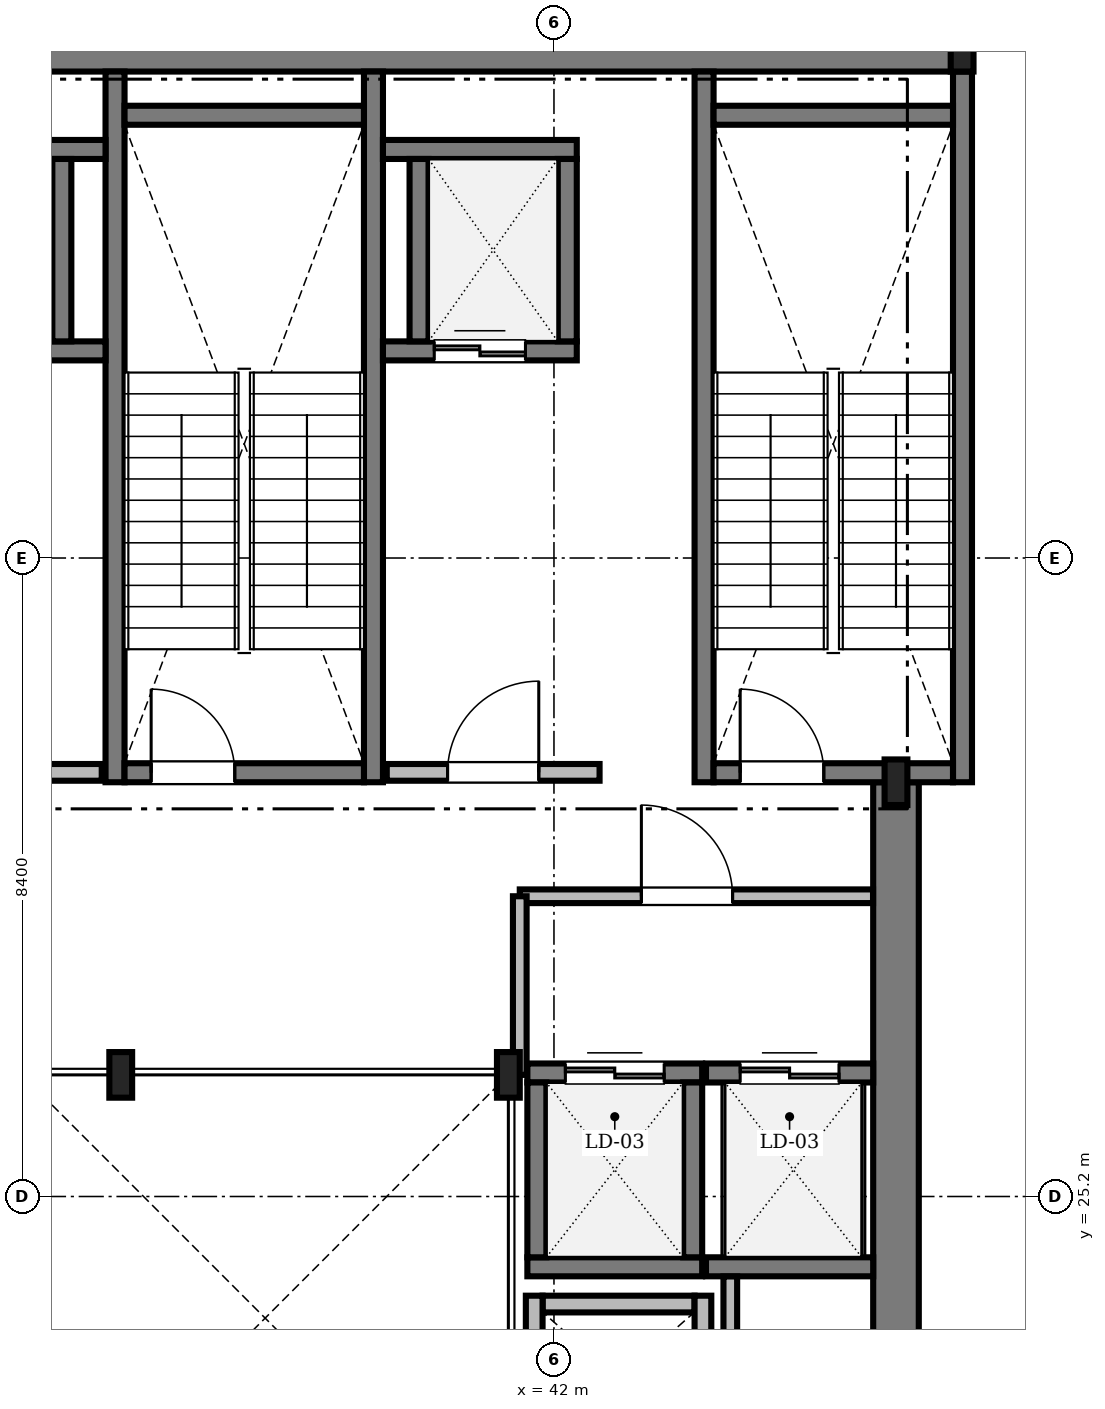
"""IFC4 building model, lengths in metres.
Left out: names, types, materials, properties, quantities, classifications, styles, units other than length and angle.
Written with IfcOpenShell. Run it as: python <this file> out.ifc"""

import sys

from ifc_helpers import new_model, si_unit, direction, frame, frame_2d, origin, origin_2d, place, context, subcontext, project, spatial, rectangle, i_section, extrude, source, transform, mapped, element, fill, save


model = new_model("IFC4")
c1 = context("Model", 3, precision=1e-05, world=origin(), true_north=direction((0.0, 1.0)))
c2 = subcontext(c1, "Body", "Model", "MODEL_VIEW")
j1 = project(units=[si_unit("LENGTHUNIT", "METRE"), si_unit("PLANEANGLEUNIT", "RADIAN")], contexts=[c1])
p1 = place(None, origin())
s1 = spatial("IfcSite", under=j1, at=p1, CompositionType="ELEMENT")
p2 = place(p1, origin())
s2 = spatial("IfcBuilding", under=s1, at=p2, CompositionType="ELEMENT")
p3 = place(p2, frame((0.0, 0.0, 286.15)))
s3 = spatial("IfcBuildingStorey", under=s2, at=p3, CompositionType="ELEMENT", Elevation=286.15)
m1 = source(origin(), c2, "Body", "SweptSolid", [
    extrude(rectangle(XDim=17.52, YDim=0.6, at=frame_2d((8.76, 0.0))), origin(), (0.0, 0.0, 1.0), 4.7),
])
p4 = place(p3, frame((29.85, 40.3, 0.0), z_axis=(0.0, 0.0, 1.0), x_axis=(1.0, 0.0, 0.0)))
e1 = element("IfcWall", 1, at=p4, inside=s3, PredefinedType="SHEAR", context=c2, shape_type="MappedRepresentation", body=[
    mapped(m1, transform((0.0, 0.0, 0.0), scale=1.0)),
])
m2 = source(origin(), c2, "Body", "SweptSolid", [
    extrude(rectangle(XDim=13.15, YDim=0.6, at=frame_2d((6.575, 0.0))), origin(), (0.0, 0.0, 1.0), 4.7),
])
p5 = place(p3, frame((46.5, 17.5, 0.0), z_axis=(0.0, 0.0, 1.0), x_axis=(0.0, 1.0, 0.0)))
e2 = element("IfcWall", 2, at=p5, inside=s3, PredefinedType="SHEAR", context=c2, shape_type="MappedRepresentation", body=[
    mapped(m2, transform((0.0, 0.0, 0.0), scale=1.0)),
])
m3 = source(origin(), c2, "Body", "SweptSolid", [
    extrude(i_section(OverallWidth=0.3, OverallDepth=0.6, WebThickness=0.015, FlangeThickness=0.03, FilletRadius=0.027, at=origin_2d()), origin(), (0.0, 0.0, 1.0), 4.7),
])
for number, where, z_axis, x_axis in (
    (3, (41.4, 26.8, 0.0), (0.0, 0.0, 1.0), (1.0, 0.0, 0.0)),
    (4, (36.3, 26.8, 0.0), (0.0, 0.0, 1.0), (1.0, 0.0, 0.0)),
    (5, (46.5, 30.65, 0.0), (0.0, 0.0, 1.0), (1.0, 0.0, 0.0)),
    (6, (47.37, 40.3, 0.0), (0.0, 0.0, 1.0), (1.0, 0.0, 0.0)),
):
    element("IfcColumn", number, at=place(p3, frame(where, z_axis=z_axis, x_axis=x_axis)), inside=s3, PredefinedType="COLUMN", context=c2, shape_type="MappedRepresentation", body=[
        mapped(m3, transform((0.0, 0.0, 0.0), scale=1.0)),
    ])
m4 = source(origin(), c2, "Body", "SweptSolid", [
    extrude(rectangle(XDim=9.35, YDim=0.25, at=frame_2d((4.675, 0.0))), origin(), (0.0, 0.0, 1.0), 4.8),
])
for number, where, z_axis, x_axis in (
    (7, (36.225, 30.65, 0.0), (0.0, 0.0, 1.0), (0.0, 1.0, 0.0)),
    (8, (39.625, 30.65, 0.0), (0.0, 0.0, 1.0), (0.0, 1.0, 0.0)),
):
    element("IfcWall", number, at=place(p3, frame(where, z_axis=z_axis, x_axis=x_axis)), inside=s3, PredefinedType="SOLIDWALL", context=c2, shape_type="MappedRepresentation", body=[
        mapped(m4, transform((0.0, 0.0, 0.0), scale=1.0)),
    ])
m5 = source(origin(), c2, "Body", "SweptSolid", [
    extrude(rectangle(XDim=3.15, YDim=0.25, at=frame_2d((1.575, 0.0))), origin(), (0.0, 0.0, 1.0), 4.8),
])
p6 = place(p3, frame((36.35, 39.425, 0.0), z_axis=(0.0, 0.0, 1.0), x_axis=(1.0, 0.0, 0.0)))
e9 = element("IfcWall", 9, at=p6, inside=s3, PredefinedType="SOLIDWALL", context=c2, shape_type="MappedRepresentation", body=[
    mapped(m5, transform((0.0, 0.0, 0.0), scale=1.0)),
])
p7 = place(p3, frame((36.35, 30.775, 0.0), z_axis=(0.0, 0.0, 1.0), x_axis=(1.0, 0.0, 0.0)))
e10 = element("IfcWall", 10, at=p7, inside=s3, PredefinedType="SOLIDWALL", context=c2, shape_type="MappedRepresentation", body=[
    mapped(m5, transform((0.0, 0.0, 0.0), scale=1.0)),
])
m6 = source(origin(), c2, "Body", "SweptSolid", [
    extrude(rectangle(XDim=1.1, YDim=2.2, at=frame_2d((0.55, 1.1))), frame((0.0, 0.135, 0.0), z_axis=(0.0, -1.0, 0.0), x_axis=(1.0, 0.0, 0.0)), (0.0, 0.0, 1.0), 0.27),
])
p8 = place(p7, frame((0.35, 0.0, 0.0)))
e11 = element("IfcOpeningElement", 11, at=p8, cuts=e10, PredefinedType="OPENING", context=c2, shape_type="MappedRepresentation", body=[
    mapped(m6, transform((0.0, 0.0, 0.0), scale=1.0)),
])
for number, where, z_axis, x_axis in (
    (12, (43.975, 30.65, 0.0), (0.0, 0.0, 1.0), (0.0, 1.0, 0.0)),
    (13, (47.375, 30.65, 0.0), (0.0, 0.0, 1.0), (0.0, 1.0, 0.0)),
):
    element("IfcWall", number, at=place(p3, frame(where, z_axis=z_axis, x_axis=x_axis)), inside=s3, PredefinedType="SOLIDWALL", context=c2, shape_type="MappedRepresentation", body=[
        mapped(m4, transform((0.0, 0.0, 0.0), scale=1.0)),
    ])
p9 = place(p3, frame((44.1, 39.425, 0.0), z_axis=(0.0, 0.0, 1.0), x_axis=(1.0, 0.0, 0.0)))
e14 = element("IfcWall", 14, at=p9, inside=s3, PredefinedType="SOLIDWALL", context=c2, shape_type="MappedRepresentation", body=[
    mapped(m5, transform((0.0, 0.0, 0.0), scale=1.0)),
])
p10 = place(p3, frame((44.1, 30.775, 0.0), z_axis=(0.0, 0.0, 1.0), x_axis=(1.0, 0.0, 0.0)))
e15 = element("IfcWall", 15, at=p10, inside=s3, PredefinedType="SOLIDWALL", context=c2, shape_type="MappedRepresentation", body=[
    mapped(m5, transform((0.0, 0.0, 0.0), scale=1.0)),
])
p11 = place(p10, frame((0.35, 0.0, 0.0)))
e16 = element("IfcOpeningElement", 16, at=p11, cuts=e15, PredefinedType="OPENING", context=c2, shape_type="MappedRepresentation", body=[
    mapped(m6, transform((0.0, 0.0, 0.0), scale=1.0)),
])
m7 = source(origin(), c2, "Body", "SweptSolid", [
    extrude(rectangle(XDim=3.0, YDim=0.22, at=frame_2d((1.5, 0.0))), origin(), (0.0, 0.0, 1.0), 4.7),
])
p12 = place(p3, frame((33.05, 30.78, 0.0), z_axis=(0.0, 0.0, 1.0), x_axis=(1.0, 0.0, 0.0)))
e17 = element("IfcWall", 17, at=p12, inside=s3, PredefinedType="SOLIDWALL", context=c2, shape_type="MappedRepresentation", body=[
    mapped(m7, transform((0.0, 0.0, 0.0), scale=1.0)),
])
m8 = source(origin(), c2, "Body", "SweptSolid", [
    extrude(rectangle(XDim=1.2, YDim=2.2, at=frame_2d((0.6, 1.1))), frame((0.0, 0.12, 0.0), z_axis=(0.0, -1.0, 0.0), x_axis=(1.0, 0.0, 0.0)), (0.0, 0.0, 1.0), 0.24),
])
p13 = place(p12, frame((0.9, 0.0, 0.0)))
e18 = element("IfcOpeningElement", 18, at=p13, cuts=e17, PredefinedType="OPENING", context=c2, shape_type="MappedRepresentation", body=[
    mapped(m8, transform((0.0, 0.0, 0.0), scale=1.0)),
])
m9 = source(origin(), c2, "Body", "SweptSolid", [
    extrude(rectangle(XDim=2.8, YDim=0.22, at=frame_2d((1.4, 0.0))), origin(), (0.0, 0.0, 1.0), 4.7),
])
p14 = place(p3, frame((39.8, 30.78, 0.0), z_axis=(0.0, 0.0, 1.0), x_axis=(1.0, 0.0, 0.0)))
e19 = element("IfcWall", 19, at=p14, inside=s3, PredefinedType="SOLIDWALL", context=c2, shape_type="MappedRepresentation", body=[
    mapped(m9, transform((0.0, 0.0, 0.0), scale=1.0)),
])
p15 = place(p14, frame((0.8, 0.0, 0.0)))
e20 = element("IfcOpeningElement", 20, at=p15, cuts=e19, PredefinedType="OPENING", context=c2, shape_type="MappedRepresentation", body=[
    mapped(m8, transform((0.0, 0.0, 0.0), scale=1.0)),
])
m10 = source(origin(), c2, "Body", "SweptSolid", [
    extrude(rectangle(XDim=3.1, YDim=0.25, at=frame_2d((1.55, 0.0))), origin(), (0.0, 0.0, 1.0), 4.7),
])
p16 = place(p3, frame((33.0, 36.325, 0.0), z_axis=(0.0, 0.0, 1.0), x_axis=(1.0, 0.0, 0.0)))
e21 = element("IfcWall", 21, at=p16, inside=s3, PredefinedType="SOLIDWALL", context=c2, shape_type="MappedRepresentation", body=[
    mapped(m10, transform((0.0, 0.0, 0.0), scale=1.0)),
])
m11 = source(origin(), c2, "Body", "SweptSolid", [
    extrude(rectangle(XDim=1.2, YDim=2.25, at=frame_2d((0.6, 1.125))), frame((0.0, 0.135, 0.0), z_axis=(0.0, -1.0, 0.0), x_axis=(1.0, 0.0, 0.0)), (0.0, 0.0, 1.0), 0.27),
])
p17 = place(p16, frame((0.95, 0.0, 0.0)))
e22 = element("IfcOpeningElement", 22, at=p17, cuts=e21, PredefinedType="OPENING", context=c2, shape_type="MappedRepresentation", body=[
    mapped(m11, transform((0.0, 0.0, 0.0), scale=1.0)),
])
p18 = place(p3, frame((33.0, 38.975, 0.0), z_axis=(0.0, 0.0, 1.0), x_axis=(1.0, 0.0, 0.0)))
e23 = element("IfcWall", 23, at=p18, inside=s3, PredefinedType="SOLIDWALL", context=c2, shape_type="MappedRepresentation", body=[
    mapped(m10, transform((0.0, 0.0, 0.0), scale=1.0)),
])
m12 = source(origin(), c2, "Body", "SweptSolid", [
    extrude(rectangle(XDim=2.4, YDim=0.25, at=frame_2d((1.2, 0.0))), origin(), (0.0, 0.0, 1.0), 4.7),
])
p19 = place(p3, frame((35.525, 36.45, 0.0), z_axis=(0.0, 0.0, 1.0), x_axis=(0.0, 1.0, 0.0)))
e24 = element("IfcWall", 24, at=p19, inside=s3, PredefinedType="SOLIDWALL", context=c2, shape_type="MappedRepresentation", body=[
    mapped(m12, transform((0.0, 0.0, 0.0), scale=1.0)),
])
m13 = source(origin(), c2, "Body", "SweptSolid", [
    extrude(rectangle(XDim=2.55, YDim=0.25, at=frame_2d((1.275, 0.0))), origin(), (0.0, 0.0, 1.0), 4.7),
])
p20 = place(p3, frame((39.75, 36.325, 0.0), z_axis=(0.0, 0.0, 1.0), x_axis=(1.0, 0.0, 0.0)))
e25 = element("IfcWall", 25, at=p20, inside=s3, PredefinedType="SOLIDWALL", context=c2, shape_type="MappedRepresentation", body=[
    mapped(m13, transform((0.0, 0.0, 0.0), scale=1.0)),
])
p21 = place(p20, frame((0.675, 0.0, 0.0)))
e26 = element("IfcOpeningElement", 26, at=p21, cuts=e25, PredefinedType="OPENING", context=c2, shape_type="MappedRepresentation", body=[
    mapped(m11, transform((0.0, 0.0, 0.0), scale=1.0)),
])
p22 = place(p3, frame((39.75, 38.975, 0.0), z_axis=(0.0, 0.0, 1.0), x_axis=(1.0, 0.0, 0.0)))
e27 = element("IfcWall", 27, at=p22, inside=s3, PredefinedType="SOLIDWALL", context=c2, shape_type="MappedRepresentation", body=[
    mapped(m13, transform((0.0, 0.0, 0.0), scale=1.0)),
])
for number, where, z_axis, x_axis in (
    (28, (40.225, 36.45, 0.0), (0.0, 0.0, 1.0), (0.0, 1.0, 0.0)),
    (29, (42.175, 36.45, 0.0), (0.0, 0.0, 1.0), (0.0, 1.0, 0.0)),
):
    element("IfcWall", number, at=place(p3, frame(where, z_axis=z_axis, x_axis=x_axis)), inside=s3, PredefinedType="SOLIDWALL", context=c2, shape_type="MappedRepresentation", body=[
        mapped(m12, transform((0.0, 0.0, 0.0), scale=1.0)),
    ])
m14 = source(origin(), c2, "Body", "SweptSolid", [
    extrude(rectangle(XDim=2.0, YDim=0.22, at=frame_2d((1.0, 0.0))), origin(), (0.0, 0.0, 1.0), 4.7),
])
p23 = place(p3, frame((41.85, 23.785, 0.0), z_axis=(0.0, 0.0, 1.0), x_axis=(1.0, 0.0, 0.0)))
e30 = element("IfcWall", 30, at=p23, inside=s3, PredefinedType="SOLIDWALL", context=c2, shape_type="MappedRepresentation", body=[
    mapped(m14, transform((0.0, 0.0, 0.0), scale=1.0)),
])
m15 = source(origin(), c2, "Body", "SweptSolid", [
    extrude(rectangle(XDim=2.19, YDim=0.22, at=frame_2d((1.095, 0.0))), origin(), (0.0, 0.0, 1.0), 4.422),
])
for number, where, z_axis, x_axis in (
    (31, (41.74, 21.705, 0.0), (0.0, 0.0, 1.0), (0.0, 1.0, 0.0)),
    (32, (43.96, 21.705, 0.0), (0.0, 0.0, 1.0), (0.0, 1.0, 0.0)),
):
    element("IfcWall", number, at=place(p3, frame(where, z_axis=z_axis, x_axis=x_axis)), inside=s3, PredefinedType="SOLIDWALL", context=c2, shape_type="MappedRepresentation", body=[
        mapped(m15, transform((0.0, 0.0, 0.0), scale=1.0)),
    ])
m16 = source(origin(), c2, "Body", "SweptSolid", [
    extrude(rectangle(XDim=2.3, YDim=0.25, at=frame_2d((1.15, 0.0))), origin(), (0.0, 0.0, 1.0), 4.7),
])
p24 = place(p3, frame((41.65, 24.275, 0.0), z_axis=(0.0, 0.0, 1.0), x_axis=(1.0, 0.0, 0.0)))
e33 = element("IfcWall", 33, at=p24, inside=s3, PredefinedType="SOLIDWALL", context=c2, shape_type="MappedRepresentation", body=[
    mapped(m16, transform((0.0, 0.0, 0.0), scale=1.0)),
])
p25 = place(p3, frame((41.65, 26.825, 0.0), z_axis=(0.0, 0.0, 1.0), x_axis=(1.0, 0.0, 0.0)))
e34 = element("IfcWall", 34, at=p25, inside=s3, PredefinedType="SOLIDWALL", context=c2, shape_type="MappedRepresentation", body=[
    mapped(m16, transform((0.0, 0.0, 0.0), scale=1.0)),
])
m17 = source(origin(), c2, "Body", "SweptSolid", [
    extrude(rectangle(XDim=1.3, YDim=2.3, at=frame_2d((0.65, 1.15))), frame((0.0, 0.135, 0.0), z_axis=(0.0, -1.0, 0.0), x_axis=(1.0, 0.0, 0.0)), (0.0, 0.0, 1.0), 0.27),
])
p26 = place(p25, frame((0.5, 0.0, 0.0)))
e35 = element("IfcOpeningElement", 35, at=p26, cuts=e34, PredefinedType="OPENING", context=c2, shape_type="MappedRepresentation", body=[
    mapped(m17, transform((0.0, 0.0, 0.0), scale=1.0)),
])
for number, where, z_axis, x_axis in (
    (36, (41.775, 24.4, 0.0), (0.0, 0.0, 1.0), (0.0, 1.0, 0.0)),
    (37, (43.825, 24.4, 0.0), (0.0, 0.0, 1.0), (0.0, 1.0, 0.0)),
):
    element("IfcWall", number, at=place(p3, frame(where, z_axis=z_axis, x_axis=x_axis)), inside=s3, PredefinedType="SOLIDWALL", context=c2, shape_type="MappedRepresentation", body=[
        mapped(m16, transform((0.0, 0.0, 0.0), scale=1.0)),
    ])
m18 = source(origin(), c2, "Body", "SweptSolid", [
    extrude(rectangle(XDim=2.2, YDim=0.25, at=frame_2d((1.1, 0.0))), origin(), (0.0, 0.0, 1.0), 4.7),
])
p27 = place(p3, frame((44.0, 24.275, 0.0), z_axis=(0.0, 0.0, 1.0), x_axis=(1.0, 0.0, 0.0)))
e38 = element("IfcWall", 38, at=p27, inside=s3, PredefinedType="SOLIDWALL", context=c2, shape_type="MappedRepresentation", body=[
    mapped(m18, transform((0.0, 0.0, 0.0), scale=1.0)),
])
p28 = place(p3, frame((44.0, 26.825, 0.0), z_axis=(0.0, 0.0, 1.0), x_axis=(1.0, 0.0, 0.0)))
e39 = element("IfcWall", 39, at=p28, inside=s3, PredefinedType="SOLIDWALL", context=c2, shape_type="MappedRepresentation", body=[
    mapped(m18, transform((0.0, 0.0, 0.0), scale=1.0)),
])
p29 = place(p28, frame((0.45, 0.0, 0.0)))
e40 = element("IfcOpeningElement", 40, at=p29, cuts=e39, PredefinedType="OPENING", context=c2, shape_type="MappedRepresentation", body=[
    mapped(m17, transform((0.0, 0.0, 0.0), scale=1.0)),
])
m19 = source(origin(), c2, "Body", "SweptSolid", [
    extrude(rectangle(XDim=4.648, YDim=0.18, at=frame_2d((2.324, 0.0))), origin(), (0.0, 0.0, 1.0), 4.332),
])
p30 = place(p3, frame((41.55, 29.15, 0.0), z_axis=(0.0, 0.0, 1.0), x_axis=(1.0, 0.0, 0.0)))
e41 = element("IfcWall", 41, at=p30, inside=s3, PredefinedType="PARTITIONING", context=c2, shape_type="MappedRepresentation", body=[
    mapped(m19, transform((0.0, 0.0, 0.0), scale=1.0)),
])
m20 = source(origin(), c2, "Body", "SweptSolid", [
    extrude(rectangle(XDim=1.2, YDim=2.2, at=frame_2d((0.6, 1.1))), frame((0.0, 0.1, 0.0), z_axis=(0.0, -1.0, 0.0), x_axis=(1.0, 0.0, 0.0)), (0.0, 0.0, 1.0), 0.2),
])
p31 = place(p30, frame((1.6, 0.0, 0.0)))
e42 = element("IfcOpeningElement", 42, at=p31, cuts=e41, PredefinedType="OPENING", context=c2, shape_type="MappedRepresentation", body=[
    mapped(m20, transform((0.0, 0.0, 0.0), scale=1.0)),
])
m21 = source(origin(), c2, "Body", "SweptSolid", [
    extrude(rectangle(XDim=6.788, YDim=0.18, at=frame_2d((3.394, 0.0))), origin(), (0.0, 0.0, 1.0), 4.142),
])
p32 = place(p3, frame((44.32, 17.36, 0.0), z_axis=(0.0, 0.0, 1.0), x_axis=(0.0, 1.0, 0.0)))
e43 = element("IfcWall", 43, at=p32, inside=s3, PredefinedType="PARTITIONING", context=c2, shape_type="MappedRepresentation", body=[
    mapped(m21, transform((0.0, 0.0, 0.0), scale=1.0)),
])
m22 = source(origin(), c2, "Body", "SweptSolid", [
    extrude(rectangle(XDim=2.35, YDim=0.18, at=frame_2d((1.175, 0.0))), origin(), (0.0, 0.0, 1.0), 4.332),
])
p33 = place(p3, frame((41.55, 26.8, 0.0), z_axis=(0.0, 0.0, 1.0), x_axis=(0.0, 1.0, 0.0)))
e44 = element("IfcWall", 44, at=p33, inside=s3, PredefinedType="PARTITIONING", context=c2, shape_type="MappedRepresentation", body=[
    mapped(m22, transform((0.0, 0.0, 0.0), scale=1.0)),
])
m23 = source(origin(), c2, "Body", "SweptSolid", [
    extrude(rectangle(XDim=1.1, YDim=2.2, at=frame_2d((0.55, 1.1))), frame((0.0, 0.025, 0.0), z_axis=(0.0, -1.0, 0.0), x_axis=(1.0, 0.0, 0.0)), (0.0, 0.0, 1.0), 0.05),
])
p34 = place(p8, origin())
e45 = element("IfcDoor", 45, at=p34, inside=s3, OperationType="SINGLE_SWING_LEFT", PredefinedType="DOOR", context=c2, shape_type="MappedRepresentation", body=[
    mapped(m23, transform((0.0, 0.0, 0.0), scale=1.0)),
])
fill(e11, e45)
p35 = place(p11, origin())
e46 = element("IfcDoor", 46, at=p35, inside=s3, OperationType="SINGLE_SWING_LEFT", PredefinedType="DOOR", context=c2, shape_type="MappedRepresentation", body=[
    mapped(m23, transform((0.0, 0.0, 0.0), scale=1.0)),
])
fill(e16, e46)
m24 = source(origin(), c2, "Body", "SweptSolid", [
    extrude(rectangle(XDim=1.2, YDim=2.2, at=frame_2d((0.6, 1.1))), frame((0.0, 0.025, 0.0), z_axis=(0.0, -1.0, 0.0), x_axis=(1.0, 0.0, 0.0)), (0.0, 0.0, 1.0), 0.05),
])
p36 = place(p15, origin())
e47 = element("IfcDoor", 47, at=p36, inside=s3, OperationType="SINGLE_SWING_RIGHT", PredefinedType="DOOR", context=c2, shape_type="MappedRepresentation", body=[
    mapped(m24, transform((0.0, 0.0, 0.0), scale=1.0)),
])
fill(e20, e47)
m25 = source(origin(), c2, "Body", "SweptSolid", [
    extrude(rectangle(XDim=1.2, YDim=2.25, at=frame_2d((0.6, 1.125))), frame((0.0, 0.025, 0.0), z_axis=(0.0, -1.0, 0.0), x_axis=(1.0, 0.0, 0.0)), (0.0, 0.0, 1.0), 0.05),
])
p37 = place(p21, origin())
e48 = element("IfcDoor", 48, at=p37, inside=s3, OperationType="DOUBLE_DOOR_SLIDING", PredefinedType="DOOR", context=c2, shape_type="MappedRepresentation", body=[
    mapped(m25, transform((0.0, 0.0, 0.0), scale=1.0)),
])
fill(e26, e48)
m26 = source(origin(), c2, "Body", "SweptSolid", [
    extrude(rectangle(XDim=1.3, YDim=2.3, at=frame_2d((0.65, 1.15))), frame((0.0, 0.025, 0.0), z_axis=(0.0, -1.0, 0.0), x_axis=(1.0, 0.0, 0.0)), (0.0, 0.0, 1.0), 0.05),
])
p38 = place(p26, origin())
e49 = element("IfcDoor", 49, at=p38, inside=s3, OperationType="DOUBLE_DOOR_SLIDING", PredefinedType="DOOR", context=c2, shape_type="MappedRepresentation", body=[
    mapped(m26, transform((0.0, 0.0, 0.0), scale=1.0)),
])
fill(e35, e49)
p39 = place(p29, origin())
e50 = element("IfcDoor", 50, at=p39, inside=s3, OperationType="DOUBLE_DOOR_SLIDING", PredefinedType="DOOR", context=c2, shape_type="MappedRepresentation", body=[
    mapped(m26, transform((0.0, 0.0, 0.0), scale=1.0)),
])
fill(e40, e50)
p40 = place(p31, origin())
e51 = element("IfcDoor", 51, at=p40, inside=s3, OperationType="SINGLE_SWING_LEFT", PredefinedType="DOOR", context=c2, shape_type="MappedRepresentation", body=[
    mapped(m24, transform((0.0, 0.0, 0.0), scale=1.0)),
])
fill(e42, e51)
save(model, sys.argv[1])
